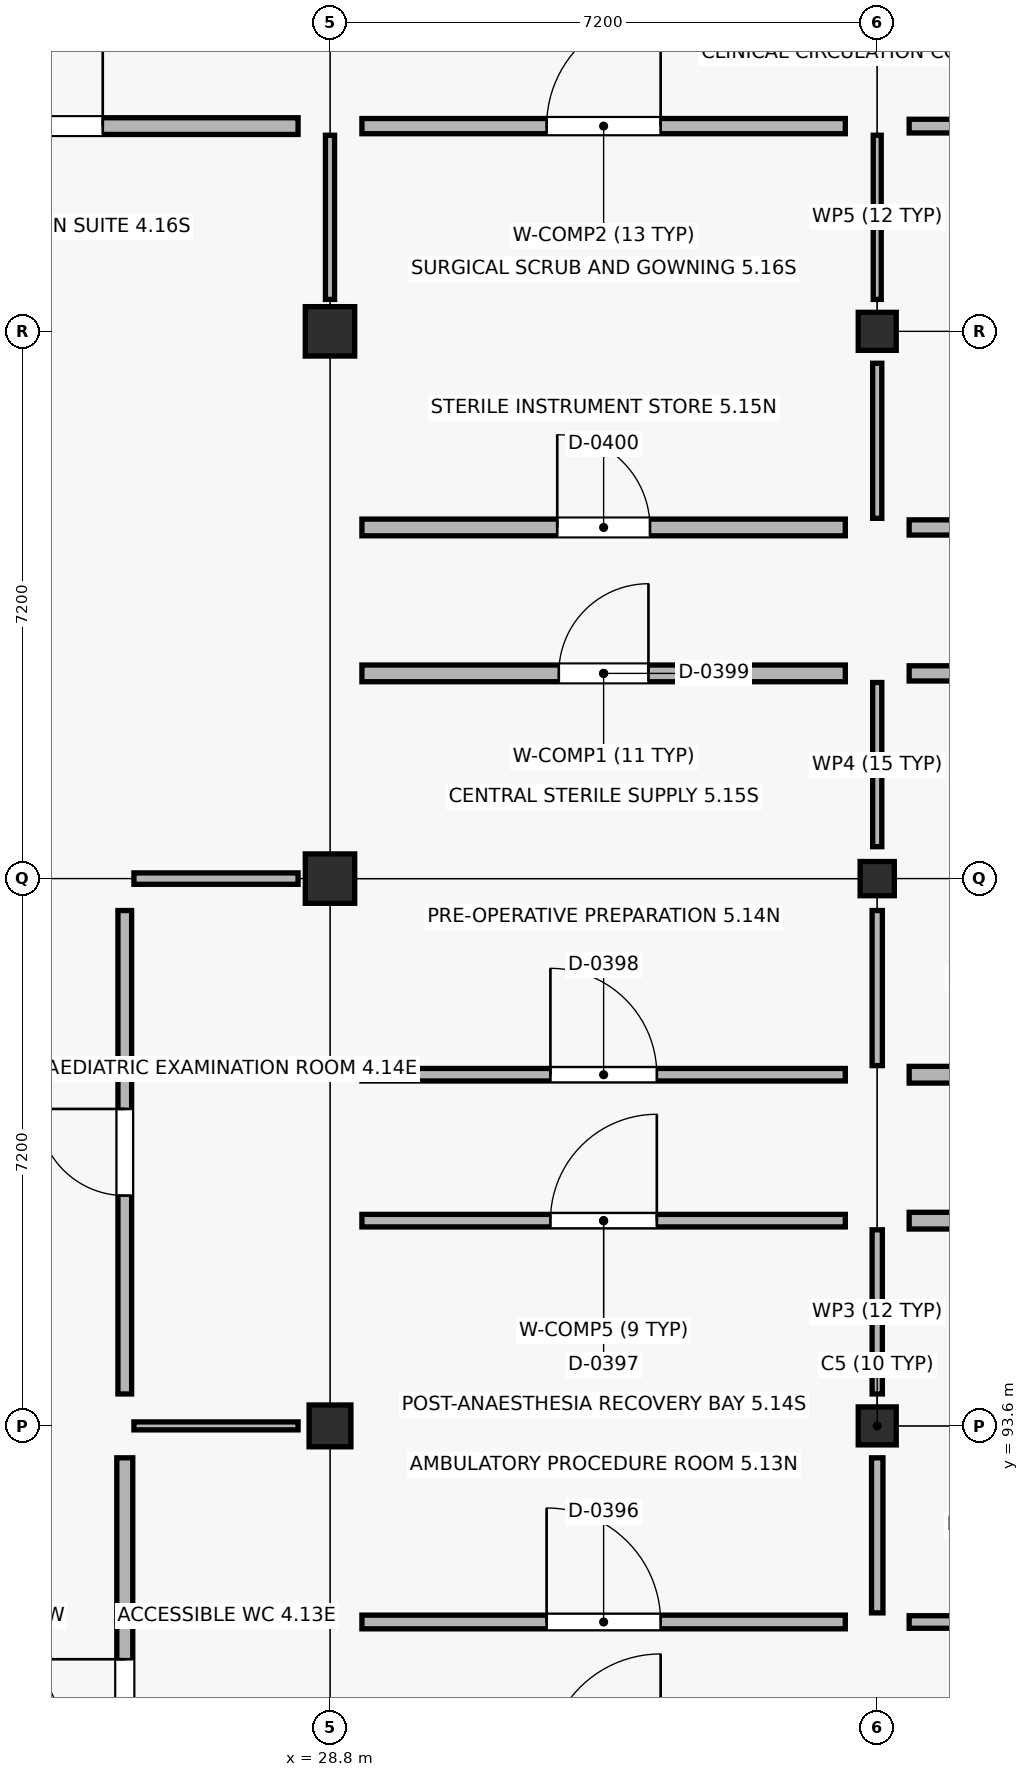
"""IFC4 building model, lengths in metres.
Left out: names, types, materials, properties, quantities, classifications, styles, units other than length and angle.
Written with IfcOpenShell. Run it as: python <this file> out.ifc"""

import sys

from ifc_helpers import new_model, si_unit, direction, frame, frame_2d, origin, origin_2d, place, context, subcontext, project, spatial, rectangle, extrude, element, fill, save


model = new_model("IFC4")
c1 = context("Model", 3, precision=1e-05, world=origin(), true_north=direction((0.0, 1.0)))
c2 = subcontext(c1, "Body", "Model", "MODEL_VIEW")
j1 = project(units=[si_unit("LENGTHUNIT", "METRE"), si_unit("PLANEANGLEUNIT", "RADIAN")], contexts=[c1])
p1 = place(None, origin())
s1 = spatial("IfcSite", under=j1, at=p1, CompositionType="ELEMENT")
p2 = place(p1, origin())
s2 = spatial("IfcBuilding", under=s1, at=p2, CompositionType="ELEMENT")
p3 = place(p2, frame((0.0, 0.0, 9.0)))
s3 = spatial("IfcBuildingStorey", under=s2, at=p3, CompositionType="ELEMENT", Elevation=9.0)
p4 = place(p3, frame((28.8, 93.6, 0.0), z_axis=(0.0, 0.0, 1.0), x_axis=(1.0, 0.0, 0.0)))
e1 = element("IfcColumn", 1, at=p4, inside=s3, PredefinedType="COLUMN", context=c2, shape_type="SweptSolid", body=[
    extrude(rectangle(XDim=0.55, YDim=0.55, at=origin_2d()), origin(), (0.0, 0.0, 1.0), 4.5),
])
for number, where, z_axis, x_axis in (
    (2, (28.8, 100.8, 0.0), (0.0, 0.0, 1.0), (1.0, 0.0, 0.0)),
    (3, (28.8, 108.0, 0.0), (0.0, 0.0, 1.0), (1.0, 0.0, 0.0)),
):
    element("IfcColumn", number, at=place(p3, frame(where, z_axis=z_axis, x_axis=x_axis)), inside=s3, PredefinedType="COLUMN", context=c2, shape_type="SweptSolid", body=[
        extrude(rectangle(XDim=0.65, YDim=0.65, at=origin_2d()), origin(), (0.0, 0.0, 1.0), 4.5),
    ])
p5 = place(p3, frame((36.0, 93.6, 0.0), z_axis=(0.0, 0.0, 1.0), x_axis=(1.0, 0.0, 0.0)))
e4 = element("IfcColumn", 4, at=p5, inside=s3, PredefinedType="COLUMN", context=c2, shape_type="SweptSolid", body=[
    extrude(rectangle(XDim=0.5, YDim=0.5, at=origin_2d()), origin(), (0.0, 0.0, 1.0), 4.28),
])
p6 = place(p3, frame((36.0, 100.8, 0.0), z_axis=(0.0, 0.0, 1.0), x_axis=(1.0, 0.0, 0.0)))
e5 = element("IfcColumn", 5, at=p6, inside=s3, PredefinedType="COLUMN", context=c2, shape_type="SweptSolid", body=[
    extrude(rectangle(XDim=0.45, YDim=0.45, at=origin_2d()), origin(), (0.0, 0.0, 1.0), 4.28),
])
p7 = place(p3, frame((36.0, 108.0, 0.0), z_axis=(0.0, 0.0, 1.0), x_axis=(1.0, 0.0, 0.0)))
e6 = element("IfcColumn", 6, at=p7, inside=s3, PredefinedType="COLUMN", context=c2, shape_type="SweptSolid", body=[
    extrude(rectangle(XDim=0.5, YDim=0.5, at=origin_2d()), origin(), (0.0, 0.0, 1.0), 4.28),
])
p8 = place(p3, frame((29.22, 91.02, 0.0), z_axis=(0.0, 0.0, 1.0), x_axis=(1.0, 0.0, 0.0)))
e7 = element("IfcWall", 7, at=p8, inside=s3, PredefinedType="PARTITIONING", context=c2, shape_type="SweptSolid", body=[
    extrude(rectangle(XDim=6.36, YDim=0.18, at=frame_2d((3.18, 0.0))), origin(), (0.0, 0.0, 1.0), 3.38),
])
p9 = place(p8, frame((2.43, 0.0, 0.0)))
e8 = element("IfcOpeningElement", 8, at=p9, cuts=e7, PredefinedType="OPENING", context=c2, shape_type="SweptSolid", body=[
    extrude(rectangle(XDim=1.5, YDim=2.2, at=frame_2d((0.75, 1.1))), frame((0.0, 0.1, 0.0), z_axis=(0.0, -1.0, 0.0), x_axis=(1.0, 0.0, 0.0)), (0.0, 0.0, 1.0), 0.2),
])
p10 = place(p3, frame((36.0, 91.14, 0.0), z_axis=(0.0, 0.0, 1.0), x_axis=(0.0, 1.0, 0.0)))
e9 = element("IfcWall", 9, at=p10, inside=s3, PredefinedType="PARTITIONING", context=c2, shape_type="SweptSolid", body=[
    extrude(rectangle(XDim=2.04, YDim=0.15, at=frame_2d((1.02, 0.0))), origin(), (0.0, 0.0, 1.0), 3.38),
])
p11 = place(p3, frame((29.22, 96.3, 0.0), z_axis=(0.0, 0.0, 1.0), x_axis=(1.0, 0.0, 0.0)))
e10 = element("IfcWall", 10, at=p11, inside=s3, PredefinedType="PARTITIONING", context=c2, shape_type="SweptSolid", body=[
    extrude(rectangle(XDim=6.36, YDim=0.165, at=frame_2d((3.18, 0.0))), origin(), (0.0, 0.0, 1.0), 3.38),
])
p12 = place(p11, frame((2.48, 0.0, 0.0)))
e11 = element("IfcOpeningElement", 11, at=p12, cuts=e10, PredefinedType="OPENING", context=c2, shape_type="SweptSolid", body=[
    extrude(rectangle(XDim=1.4, YDim=2.2, at=frame_2d((0.7, 1.1))), frame((0.0, 0.093, 0.0), z_axis=(0.0, -1.0, 0.0), x_axis=(1.0, 0.0, 0.0)), (0.0, 0.0, 1.0), 0.185),
])
p13 = place(p3, frame((36.0, 94.02, 0.0), z_axis=(0.0, 0.0, 1.0), x_axis=(0.0, 1.0, 0.0)))
e12 = element("IfcWall", 12, at=p13, inside=s3, PredefinedType="PARTITIONING", context=c2, shape_type="SweptSolid", body=[
    extrude(rectangle(XDim=2.16, YDim=0.135, at=frame_2d((1.08, 0.0))), origin(), (0.0, 0.0, 1.0), 3.38),
])
p14 = place(p3, frame((29.22, 98.22, 0.0), z_axis=(0.0, 0.0, 1.0), x_axis=(1.0, 0.0, 0.0)))
e13 = element("IfcWall", 13, at=p14, inside=s3, PredefinedType="PARTITIONING", context=c2, shape_type="SweptSolid", body=[
    extrude(rectangle(XDim=6.36, YDim=0.165, at=frame_2d((3.18, 0.0))), origin(), (0.0, 0.0, 1.0), 3.38),
])
p15 = place(p14, frame((2.48, 0.0, 0.0)))
e14 = element("IfcOpeningElement", 14, at=p15, cuts=e13, PredefinedType="OPENING", context=c2, shape_type="SweptSolid", body=[
    extrude(rectangle(XDim=1.4, YDim=2.2, at=frame_2d((0.7, 1.1))), frame((0.0, 0.093, 0.0), z_axis=(0.0, -1.0, 0.0), x_axis=(1.0, 0.0, 0.0)), (0.0, 0.0, 1.0), 0.185),
])
p16 = place(p3, frame((36.0, 98.34, 0.0), z_axis=(0.0, 0.0, 1.0), x_axis=(0.0, 1.0, 0.0)))
e15 = element("IfcWall", 15, at=p16, inside=s3, PredefinedType="PARTITIONING", context=c2, shape_type="SweptSolid", body=[
    extrude(rectangle(XDim=2.04, YDim=0.135, at=frame_2d((1.02, 0.0))), origin(), (0.0, 0.0, 1.0), 3.38),
])
p17 = place(p3, frame((29.22, 103.5, 0.0), z_axis=(0.0, 0.0, 1.0), x_axis=(1.0, 0.0, 0.0)))
e16 = element("IfcWall", 16, at=p17, inside=s3, PredefinedType="SOLIDWALL", context=c2, shape_type="SweptSolid", body=[
    extrude(rectangle(XDim=6.36, YDim=0.22, at=frame_2d((3.18, 0.0))), origin(), (0.0, 0.0, 1.0), 3.38),
])
p18 = place(p17, frame((2.59, 0.0, 0.0)))
e17 = element("IfcOpeningElement", 17, at=p18, cuts=e16, PredefinedType="OPENING", context=c2, shape_type="SweptSolid", body=[
    extrude(rectangle(XDim=1.18, YDim=2.14, at=frame_2d((0.59, 1.07))), frame((0.0, 0.12, 0.0), z_axis=(0.0, -1.0, 0.0), x_axis=(1.0, 0.0, 0.0)), (0.0, 0.0, 1.0), 0.24),
])
p19 = place(p3, frame((36.0, 101.22, 0.0), z_axis=(0.0, 0.0, 1.0), x_axis=(0.0, 1.0, 0.0)))
e18 = element("IfcWall", 18, at=p19, inside=s3, PredefinedType="PARTITIONING", context=c2, shape_type="SweptSolid", body=[
    extrude(rectangle(XDim=2.16, YDim=0.12, at=frame_2d((1.08, 0.0))), origin(), (0.0, 0.0, 1.0), 3.38),
])
p20 = place(p3, frame((29.22, 105.42, 0.0), z_axis=(0.0, 0.0, 1.0), x_axis=(1.0, 0.0, 0.0)))
e19 = element("IfcWall", 19, at=p20, inside=s3, PredefinedType="SOLIDWALL", context=c2, shape_type="SweptSolid", body=[
    extrude(rectangle(XDim=6.36, YDim=0.22, at=frame_2d((3.18, 0.0))), origin(), (0.0, 0.0, 1.0), 3.38),
])
p21 = place(p20, frame((2.57, 0.0, 0.0)))
e20 = element("IfcOpeningElement", 20, at=p21, cuts=e19, PredefinedType="OPENING", context=c2, shape_type="SweptSolid", body=[
    extrude(rectangle(XDim=1.22, YDim=2.14, at=frame_2d((0.61, 1.07))), frame((0.0, 0.12, 0.0), z_axis=(0.0, -1.0, 0.0), x_axis=(1.0, 0.0, 0.0)), (0.0, 0.0, 1.0), 0.24),
])
p22 = place(p3, frame((36.0, 105.54, 0.0), z_axis=(0.0, 0.0, 1.0), x_axis=(0.0, 1.0, 0.0)))
e21 = element("IfcWall", 21, at=p22, inside=s3, PredefinedType="PARTITIONING", context=c2, shape_type="SweptSolid", body=[
    extrude(rectangle(XDim=2.04, YDim=0.12, at=frame_2d((1.02, 0.0))), origin(), (0.0, 0.0, 1.0), 3.38),
])
p23 = place(p3, frame((29.22, 110.7, 0.0), z_axis=(0.0, 0.0, 1.0), x_axis=(1.0, 0.0, 0.0)))
e22 = element("IfcWall", 22, at=p23, inside=s3, PredefinedType="SOLIDWALL", context=c2, shape_type="SweptSolid", body=[
    extrude(rectangle(XDim=6.36, YDim=0.2, at=frame_2d((3.18, 0.0))), origin(), (0.0, 0.0, 1.0), 3.38),
])
p24 = place(p23, frame((2.43, 0.0, 0.0)))
e23 = element("IfcOpeningElement", 23, at=p24, cuts=e22, PredefinedType="OPENING", context=c2, shape_type="SweptSolid", body=[
    extrude(rectangle(XDim=1.5, YDim=2.2, at=frame_2d((0.75, 1.1))), frame((0.0, 0.11, 0.0), z_axis=(0.0, -1.0, 0.0), x_axis=(1.0, 0.0, 0.0)), (0.0, 0.0, 1.0), 0.22),
])
p25 = place(p3, frame((36.0, 108.42, 0.0), z_axis=(0.0, 0.0, 1.0), x_axis=(0.0, 1.0, 0.0)))
e24 = element("IfcWall", 24, at=p25, inside=s3, PredefinedType="PARTITIONING", context=c2, shape_type="SweptSolid", body=[
    extrude(rectangle(XDim=2.16, YDim=0.105, at=frame_2d((1.08, 0.0))), origin(), (0.0, 0.0, 1.0), 3.38),
])
p26 = place(p3, frame((36.42, 91.02, 0.0), z_axis=(0.0, 0.0, 1.0), x_axis=(1.0, 0.0, 0.0)))
e25 = element("IfcWall", 25, at=p26, inside=s3, PredefinedType="PARTITIONING", context=c2, shape_type="SweptSolid", body=[
    extrude(rectangle(XDim=6.36, YDim=0.165, at=frame_2d((3.18, 0.0))), origin(), (0.0, 0.0, 1.0), 3.38),
])
p27 = place(p26, frame((2.43, 0.0, 0.0)))
e26 = element("IfcOpeningElement", 26, at=p27, cuts=e25, PredefinedType="OPENING", context=c2, shape_type="SweptSolid", body=[
    extrude(rectangle(XDim=1.5, YDim=2.2, at=frame_2d((0.75, 1.1))), frame((0.0, 0.093, 0.0), z_axis=(0.0, -1.0, 0.0), x_axis=(1.0, 0.0, 0.0)), (0.0, 0.0, 1.0), 0.185),
])
p28 = place(p3, frame((36.42, 96.3, 0.0), z_axis=(0.0, 0.0, 1.0), x_axis=(1.0, 0.0, 0.0)))
e27 = element("IfcWall", 27, at=p28, inside=s3, PredefinedType="SOLIDWALL", context=c2, shape_type="SweptSolid", body=[
    extrude(rectangle(XDim=6.36, YDim=0.22, at=frame_2d((3.18, 0.0))), origin(), (0.0, 0.0, 1.0), 3.38),
])
p29 = place(p28, frame((2.43, 0.0, 0.0)))
e28 = element("IfcOpeningElement", 28, at=p29, cuts=e27, PredefinedType="OPENING", context=c2, shape_type="SweptSolid", body=[
    extrude(rectangle(XDim=1.5, YDim=2.2, at=frame_2d((0.75, 1.1))), frame((0.0, 0.12, 0.0), z_axis=(0.0, -1.0, 0.0), x_axis=(1.0, 0.0, 0.0)), (0.0, 0.0, 1.0), 0.24),
])
p30 = place(p3, frame((36.42, 98.22, 0.0), z_axis=(0.0, 0.0, 1.0), x_axis=(1.0, 0.0, 0.0)))
e29 = element("IfcWall", 29, at=p30, inside=s3, PredefinedType="SOLIDWALL", context=c2, shape_type="SweptSolid", body=[
    extrude(rectangle(XDim=6.36, YDim=0.22, at=frame_2d((3.18, 0.0))), origin(), (0.0, 0.0, 1.0), 3.38),
])
p31 = place(p30, frame((2.48, 0.0, 0.0)))
e30 = element("IfcOpeningElement", 30, at=p31, cuts=e29, PredefinedType="OPENING", context=c2, shape_type="SweptSolid", body=[
    extrude(rectangle(XDim=1.4, YDim=2.2, at=frame_2d((0.7, 1.1))), frame((0.0, 0.12, 0.0), z_axis=(0.0, -1.0, 0.0), x_axis=(1.0, 0.0, 0.0)), (0.0, 0.0, 1.0), 0.24),
])
p32 = place(p3, frame((36.42, 103.5, 0.0), z_axis=(0.0, 0.0, 1.0), x_axis=(1.0, 0.0, 0.0)))
e31 = element("IfcWall", 31, at=p32, inside=s3, PredefinedType="SOLIDWALL", context=c2, shape_type="SweptSolid", body=[
    extrude(rectangle(XDim=6.36, YDim=0.2, at=frame_2d((3.18, 0.0))), origin(), (0.0, 0.0, 1.0), 3.38),
])
p33 = place(p32, frame((2.48, 0.0, 0.0)))
e32 = element("IfcOpeningElement", 32, at=p33, cuts=e31, PredefinedType="OPENING", context=c2, shape_type="SweptSolid", body=[
    extrude(rectangle(XDim=1.4, YDim=2.2, at=frame_2d((0.7, 1.1))), frame((0.0, 0.11, 0.0), z_axis=(0.0, -1.0, 0.0), x_axis=(1.0, 0.0, 0.0)), (0.0, 0.0, 1.0), 0.22),
])
p34 = place(p3, frame((36.42, 105.42, 0.0), z_axis=(0.0, 0.0, 1.0), x_axis=(1.0, 0.0, 0.0)))
e33 = element("IfcWall", 33, at=p34, inside=s3, PredefinedType="SOLIDWALL", context=c2, shape_type="SweptSolid", body=[
    extrude(rectangle(XDim=6.36, YDim=0.2, at=frame_2d((3.18, 0.0))), origin(), (0.0, 0.0, 1.0), 3.38),
])
p35 = place(p34, frame((2.73, 0.0, 0.0)))
e34 = element("IfcOpeningElement", 34, at=p35, cuts=e33, PredefinedType="OPENING", context=c2, shape_type="SweptSolid", body=[
    extrude(rectangle(XDim=0.9, YDim=2.19, at=frame_2d((0.45, 1.095))), frame((0.0, 0.11, 0.0), z_axis=(0.0, -1.0, 0.0), x_axis=(1.0, 0.0, 0.0)), (0.0, 0.0, 1.0), 0.22),
])
p36 = place(p3, frame((36.42, 110.7, 0.0), z_axis=(0.0, 0.0, 1.0), x_axis=(1.0, 0.0, 0.0)))
e35 = element("IfcWall", 35, at=p36, inside=s3, PredefinedType="PARTITIONING", context=c2, shape_type="SweptSolid", body=[
    extrude(rectangle(XDim=6.36, YDim=0.18, at=frame_2d((3.18, 0.0))), origin(), (0.0, 0.0, 1.0), 3.38),
])
p37 = place(p36, frame((2.71, 0.0, 0.0)))
e36 = element("IfcOpeningElement", 36, at=p37, cuts=e35, PredefinedType="OPENING", context=c2, shape_type="SweptSolid", body=[
    extrude(rectangle(XDim=0.94, YDim=2.19, at=frame_2d((0.47, 1.095))), frame((0.0, 0.1, 0.0), z_axis=(0.0, -1.0, 0.0), x_axis=(1.0, 0.0, 0.0)), (0.0, 0.0, 1.0), 0.2),
])
p38 = place(p3, frame((26.1, 86.82, 0.0), z_axis=(0.0, 0.0, 1.0), x_axis=(0.0, 1.0, 0.0)))
e37 = element("IfcWall", 37, at=p38, inside=s3, PredefinedType="PLUMBINGWALL", context=c2, shape_type="SweptSolid", body=[
    extrude(rectangle(XDim=6.36, YDim=0.21, at=frame_2d((3.18, 0.0))), origin(), (0.0, 0.0, 1.0), 3.38),
])
p39 = place(p38, frame((2.65, 0.0, 0.0)))
e38 = element("IfcOpeningElement", 38, at=p39, cuts=e37, PredefinedType="OPENING", context=c2, shape_type="SweptSolid", body=[
    extrude(rectangle(XDim=1.06, YDim=2.14, at=frame_2d((0.53, 1.07))), frame((0.0, 0.115, 0.0), z_axis=(0.0, -1.0, 0.0), x_axis=(1.0, 0.0, 0.0)), (0.0, 0.0, 1.0), 0.23),
])
p40 = place(p3, frame((26.22, 93.6, 0.0), z_axis=(0.0, 0.0, 1.0), x_axis=(1.0, 0.0, 0.0)))
e39 = element("IfcWall", 39, at=p40, inside=s3, PredefinedType="PARTITIONING", context=c2, shape_type="SweptSolid", body=[
    extrude(rectangle(XDim=2.16, YDim=0.105, at=frame_2d((1.08, 0.0))), origin(), (0.0, 0.0, 1.0), 3.38),
])
p41 = place(p3, frame((26.1, 94.02, 0.0), z_axis=(0.0, 0.0, 1.0), x_axis=(0.0, 1.0, 0.0)))
e40 = element("IfcWall", 40, at=p41, inside=s3, PredefinedType="PARTITIONING", context=c2, shape_type="SweptSolid", body=[
    extrude(rectangle(XDim=6.36, YDim=0.18, at=frame_2d((3.18, 0.0))), origin(), (0.0, 0.0, 1.0), 3.38),
])
p42 = place(p41, frame((2.61, 0.0, 0.0)))
e41 = element("IfcOpeningElement", 41, at=p42, cuts=e40, PredefinedType="OPENING", context=c2, shape_type="SweptSolid", body=[
    extrude(rectangle(XDim=1.14, YDim=2.14, at=frame_2d((0.57, 1.07))), frame((0.0, 0.1, 0.0), z_axis=(0.0, -1.0, 0.0), x_axis=(1.0, 0.0, 0.0)), (0.0, 0.0, 1.0), 0.2),
])
p43 = place(p3, frame((26.22, 100.8, 0.0), z_axis=(0.0, 0.0, 1.0), x_axis=(1.0, 0.0, 0.0)))
e42 = element("IfcWall", 42, at=p43, inside=s3, PredefinedType="PARTITIONING", context=c2, shape_type="SweptSolid", body=[
    extrude(rectangle(XDim=2.16, YDim=0.15, at=frame_2d((1.08, 0.0))), origin(), (0.0, 0.0, 1.0), 3.38),
])
p44 = place(p3, frame((22.02, 110.7, 0.0), z_axis=(0.0, 0.0, 1.0), x_axis=(1.0, 0.0, 0.0)))
e43 = element("IfcWall", 43, at=p44, inside=s3, PredefinedType="SOLIDWALL", context=c2, shape_type="SweptSolid", body=[
    extrude(rectangle(XDim=6.36, YDim=0.22, at=frame_2d((3.18, 0.0))), origin(), (0.0, 0.0, 1.0), 3.38),
])
p45 = place(p44, frame((2.57, 0.0, 0.0)))
e44 = element("IfcOpeningElement", 44, at=p45, cuts=e43, PredefinedType="OPENING", context=c2, shape_type="SweptSolid", body=[
    extrude(rectangle(XDim=1.22, YDim=2.14, at=frame_2d((0.61, 1.07))), frame((0.0, 0.12, 0.0), z_axis=(0.0, -1.0, 0.0), x_axis=(1.0, 0.0, 0.0)), (0.0, 0.0, 1.0), 0.24),
])
p46 = place(p3, frame((28.8, 108.42, 0.0), z_axis=(0.0, 0.0, 1.0), x_axis=(0.0, 1.0, 0.0)))
e45 = element("IfcWall", 45, at=p46, inside=s3, PredefinedType="PARTITIONING", context=c2, shape_type="SweptSolid", body=[
    extrude(rectangle(XDim=2.16, YDim=0.12, at=frame_2d((1.08, 0.0))), origin(), (0.0, 0.0, 1.0), 3.38),
])
p47 = place(p9, origin())
e46 = element("IfcDoor", 46, at=p47, inside=s3, OperationType="SINGLE_SWING_LEFT", PredefinedType="DOOR", context=c2, shape_type="SweptSolid", body=[
    extrude(rectangle(XDim=1.5, YDim=2.2, at=frame_2d((0.75, 1.1))), frame((0.0, 0.025, 0.0), z_axis=(0.0, -1.0, 0.0), x_axis=(1.0, 0.0, 0.0)), (0.0, 0.0, 1.0), 0.05),
])
fill(e8, e46)
p48 = place(p12, origin())
e47 = element("IfcDoor", 47, at=p48, inside=s3, OperationType="SINGLE_SWING_RIGHT", PredefinedType="DOOR", context=c2, shape_type="SweptSolid", body=[
    extrude(rectangle(XDim=1.4, YDim=2.2, at=frame_2d((0.7, 1.1))), frame((0.0, 0.025, 0.0), z_axis=(0.0, -1.0, 0.0), x_axis=(1.0, 0.0, 0.0)), (0.0, 0.0, 1.0), 0.05),
])
fill(e11, e47)
p49 = place(p15, origin())
e48 = element("IfcDoor", 48, at=p49, inside=s3, OperationType="SINGLE_SWING_LEFT", PredefinedType="DOOR", context=c2, shape_type="SweptSolid", body=[
    extrude(rectangle(XDim=1.4, YDim=2.2, at=frame_2d((0.7, 1.1))), frame((0.0, 0.025, 0.0), z_axis=(0.0, -1.0, 0.0), x_axis=(1.0, 0.0, 0.0)), (0.0, 0.0, 1.0), 0.05),
])
fill(e14, e48)
p50 = place(p18, origin())
e49 = element("IfcDoor", 49, at=p50, inside=s3, OperationType="SINGLE_SWING_RIGHT", PredefinedType="DOOR", context=c2, shape_type="SweptSolid", body=[
    extrude(rectangle(XDim=1.18, YDim=2.14, at=frame_2d((0.59, 1.07))), frame((0.0, 0.025, 0.0), z_axis=(0.0, -1.0, 0.0), x_axis=(1.0, 0.0, 0.0)), (0.0, 0.0, 1.0), 0.05),
])
fill(e17, e49)
p51 = place(p21, origin())
e50 = element("IfcDoor", 50, at=p51, inside=s3, OperationType="SINGLE_SWING_LEFT", PredefinedType="DOOR", context=c2, shape_type="SweptSolid", body=[
    extrude(rectangle(XDim=1.22, YDim=2.14, at=frame_2d((0.61, 1.07))), frame((0.0, 0.025, 0.0), z_axis=(0.0, -1.0, 0.0), x_axis=(1.0, 0.0, 0.0)), (0.0, 0.0, 1.0), 0.05),
])
fill(e20, e50)
p52 = place(p24, origin())
e51 = element("IfcDoor", 51, at=p52, inside=s3, OperationType="SINGLE_SWING_RIGHT", PredefinedType="DOOR", context=c2, shape_type="SweptSolid", body=[
    extrude(rectangle(XDim=1.5, YDim=2.2, at=frame_2d((0.75, 1.1))), frame((0.0, 0.025, 0.0), z_axis=(0.0, -1.0, 0.0), x_axis=(1.0, 0.0, 0.0)), (0.0, 0.0, 1.0), 0.05),
])
fill(e23, e51)
p53 = place(p39, origin())
e52 = element("IfcDoor", 52, at=p53, inside=s3, OperationType="SINGLE_SWING_RIGHT", PredefinedType="DOOR", context=c2, shape_type="SweptSolid", body=[
    extrude(rectangle(XDim=1.06, YDim=2.14, at=frame_2d((0.53, 1.07))), frame((0.0, 0.025, 0.0), z_axis=(0.0, -1.0, 0.0), x_axis=(1.0, 0.0, 0.0)), (0.0, 0.0, 1.0), 0.05),
])
fill(e38, e52)
p54 = place(p42, origin())
e53 = element("IfcDoor", 53, at=p54, inside=s3, OperationType="SINGLE_SWING_RIGHT", PredefinedType="DOOR", context=c2, shape_type="SweptSolid", body=[
    extrude(rectangle(XDim=1.14, YDim=2.14, at=frame_2d((0.57, 1.07))), frame((0.0, 0.025, 0.0), z_axis=(0.0, -1.0, 0.0), x_axis=(1.0, 0.0, 0.0)), (0.0, 0.0, 1.0), 0.05),
])
fill(e41, e53)
p55 = place(p45, origin())
e54 = element("IfcDoor", 54, at=p55, inside=s3, OperationType="SINGLE_SWING_RIGHT", PredefinedType="DOOR", context=c2, shape_type="SweptSolid", body=[
    extrude(rectangle(XDim=1.22, YDim=2.14, at=frame_2d((0.61, 1.07))), frame((0.0, 0.025, 0.0), z_axis=(0.0, -1.0, 0.0), x_axis=(1.0, 0.0, 0.0)), (0.0, 0.0, 1.0), 0.05),
])
fill(e44, e54)
save(model, sys.argv[1])
